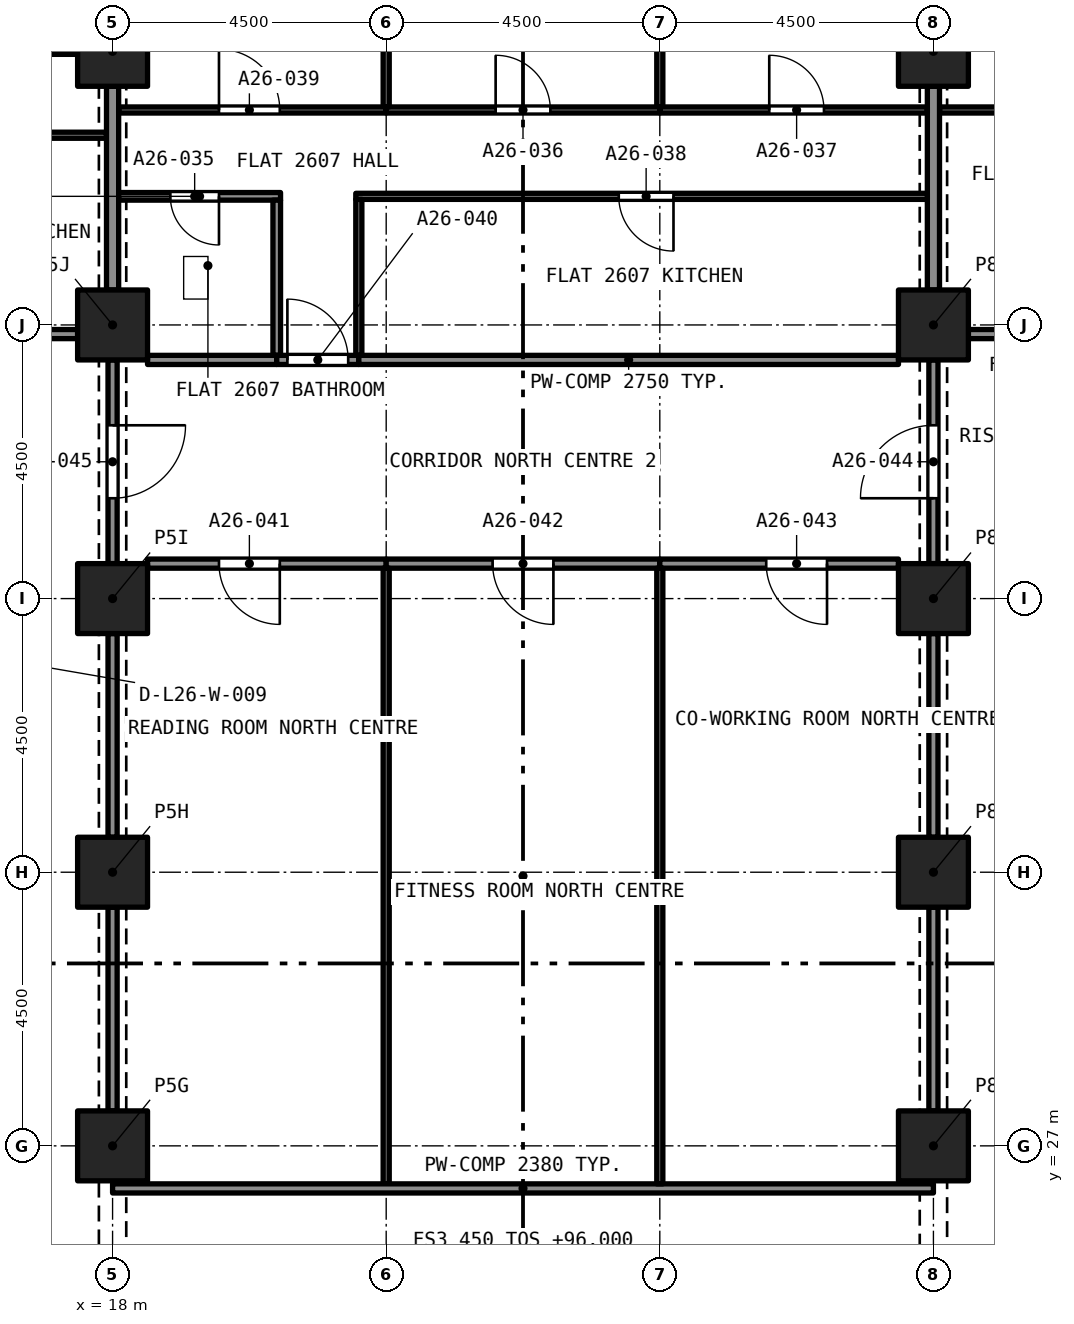
"""IFC4 building model, lengths in metres.
Left out: names, types, materials, properties, quantities, classifications, styles, units other than length and angle.
Written with IfcOpenShell. Run it as: python <this file> out.ifc"""

import sys

from ifc_helpers import new_model, si_unit, direction, frame, frame_2d, origin, origin_2d, place, context, subcontext, project, spatial, rectangle, extrude, element, fill, save


model = new_model("IFC4")
c1 = context("Model", 3, precision=1e-05, world=origin(), true_north=direction((0.0, 1.0)))
c2 = subcontext(c1, "Body", "Model", "MODEL_VIEW")
j1 = project(units=[si_unit("LENGTHUNIT", "METRE"), si_unit("PLANEANGLEUNIT", "RADIAN")], contexts=[c1])
p1 = place(None, origin())
s1 = spatial("IfcSite", under=j1, at=p1, CompositionType="ELEMENT")
p2 = place(p1, origin())
s2 = spatial("IfcBuilding", under=s1, at=p2, CompositionType="ELEMENT")
p3 = place(p2, frame((0.0, 0.0, 96.0)))
s3 = spatial("IfcBuildingStorey", under=s2, at=p3, CompositionType="ELEMENT", Elevation=96.0)
for number, where, z_axis, x_axis in (
    (1, (18.0, 27.0, 0.0), (0.0, 0.0, 1.0), (1.0, 0.0, 0.0)),
    (2, (31.5, 27.0, 0.0), (0.0, 0.0, 1.0), (1.0, 0.0, 0.0)),
    (3, (18.0, 31.5, 0.0), (0.0, 0.0, 1.0), (1.0, 0.0, 0.0)),
    (4, (31.5, 31.5, 0.0), (0.0, 0.0, 1.0), (1.0, 0.0, 0.0)),
    (5, (18.0, 36.0, 0.0), (0.0, 0.0, 1.0), (1.0, 0.0, 0.0)),
    (6, (31.5, 36.0, 0.0), (0.0, 0.0, 1.0), (1.0, 0.0, 0.0)),
    (7, (18.0, 40.5, 0.0), (0.0, 0.0, 1.0), (1.0, 0.0, 0.0)),
    (8, (31.5, 40.5, 0.0), (0.0, 0.0, 1.0), (1.0, 0.0, 0.0)),
    (9, (18.0, 45.0, 0.0), (0.0, 0.0, 1.0), (1.0, 0.0, 0.0)),
    (10, (31.5, 45.0, 0.0), (0.0, 0.0, 1.0), (1.0, 0.0, 0.0)),
):
    element("IfcColumn", number, at=place(p3, frame(where, z_axis=z_axis, x_axis=x_axis)), inside=s3, PredefinedType="COLUMN", context=c2, shape_type="SweptSolid", body=[
        extrude(rectangle(XDim=1.15, YDim=1.15, at=origin_2d()), origin(), (0.0, 0.0, 1.0), 3.2),
    ])
p4 = place(p3, frame((13.5, 45.0, 0.0), z_axis=(0.0, 0.0, 1.0), x_axis=(1.0, 0.0, 0.0)))
e11 = element("IfcWall", 11, at=p4, inside=s3, PredefinedType="PARTITIONING", context=c2, shape_type="SweptSolid", body=[
    extrude(rectangle(XDim=3.925, YDim=0.1, at=frame_2d((1.962, 0.0))), origin(), (0.0, 0.0, 1.0), 2.9),
])
p5 = place(p4, frame((1.8, 0.0, 0.0)))
e12 = element("IfcOpeningElement", 12, at=p5, cuts=e11, PredefinedType="OPENING", context=c2, shape_type="SweptSolid", body=[
    extrude(rectangle(XDim=0.9, YDim=2.1, at=frame_2d((0.45, 1.05))), frame((0.0, 0.06, 0.0), z_axis=(0.0, -1.0, 0.0), x_axis=(1.0, 0.0, 0.0)), (0.0, 0.0, 1.0), 0.12),
])
p6 = place(p3, frame((17.9, 43.62, 0.0), z_axis=(0.0, 0.0, 1.0), x_axis=(-1.0, 0.0, 0.0)))
e13 = element("IfcWall", 13, at=p6, inside=s3, PredefinedType="PARTITIONING", context=c2, shape_type="SweptSolid", body=[
    extrude(rectangle(XDim=6.172, YDim=0.1, at=frame_2d((3.086, 0.0))), origin(), (0.0, 0.0, 1.0), 2.9),
])
p7 = place(p6, frame((2.586, 0.0, 0.0)))
e14 = element("IfcOpeningElement", 14, at=p7, cuts=e13, PredefinedType="OPENING", context=c2, shape_type="SweptSolid", body=[
    extrude(rectangle(XDim=0.9, YDim=2.1, at=frame_2d((0.45, 1.05))), frame((0.0, 0.06, 0.0), z_axis=(0.0, -1.0, 0.0), x_axis=(1.0, 0.0, 0.0)), (0.0, 0.0, 1.0), 0.12),
])
p8 = place(p3, frame((18.0, 41.075, 0.0), z_axis=(0.0, 0.0, 1.0), x_axis=(0.0, 1.0, 0.0)))
e15 = element("IfcWall", 15, at=p8, inside=s3, PredefinedType="PARTITIONING", context=c2, shape_type="SweptSolid", body=[
    extrude(rectangle(XDim=3.35, YDim=0.2, at=frame_2d((1.675, 0.0))), origin(), (0.0, 0.0, 1.0), 2.38),
])
p9 = place(p3, frame((13.35, 40.35, 0.0), z_axis=(0.0, 0.0, 1.0), x_axis=(1.0, 0.0, 0.0)))
e16 = element("IfcWall", 16, at=p9, inside=s3, PredefinedType="PARTITIONING", context=c2, shape_type="SweptSolid", body=[
    extrude(rectangle(XDim=4.075, YDim=0.15, at=frame_2d((2.038, 0.0))), origin(), (0.0, 0.0, 1.0), 2.9),
])
p10 = place(p3, frame((31.6, 44.035, 0.0), z_axis=(0.0, 0.0, 1.0), x_axis=(1.0, 0.0, 0.0)))
e17 = element("IfcWall", 17, at=p10, inside=s3, PredefinedType="PARTITIONING", context=c2, shape_type="SweptSolid", body=[
    extrude(rectangle(XDim=4.4, YDim=0.1, at=frame_2d((2.2, 0.0))), origin(), (0.0, 0.0, 1.0), 2.9),
])
p11 = place(p10, frame((1.65, 0.0, 0.0)))
e18 = element("IfcOpeningElement", 18, at=p11, cuts=e17, PredefinedType="OPENING", context=c2, shape_type="SweptSolid", body=[
    extrude(rectangle(XDim=1.0, YDim=2.1, at=frame_2d((0.5, 1.05))), frame((0.0, 0.06, 0.0), z_axis=(0.0, -1.0, 0.0), x_axis=(1.0, 0.0, 0.0)), (0.0, 0.0, 1.0), 0.12),
])
p12 = place(p3, frame((31.5, 41.075, 0.0), z_axis=(0.0, 0.0, 1.0), x_axis=(0.0, 1.0, 0.0)))
e19 = element("IfcWall", 19, at=p12, inside=s3, PredefinedType="PARTITIONING", context=c2, shape_type="SweptSolid", body=[
    extrude(rectangle(XDim=3.35, YDim=0.2, at=frame_2d((1.675, 0.0))), origin(), (0.0, 0.0, 1.0), 2.38),
])
p13 = place(p3, frame((32.075, 40.35, 0.0), z_axis=(0.0, 0.0, 1.0), x_axis=(1.0, 0.0, 0.0)))
e20 = element("IfcWall", 20, at=p13, inside=s3, PredefinedType="PARTITIONING", context=c2, shape_type="SweptSolid", body=[
    extrude(rectangle(XDim=2.35, YDim=0.15, at=frame_2d((1.175, 0.0))), origin(), (0.0, 0.0, 1.0), 2.9),
])
p14 = place(p13, frame((1.175, 0.0, 0.0)))
e21 = element("IfcOpeningElement", 21, at=p14, cuts=e20, PredefinedType="OPENING", context=c2, shape_type="SweptSolid", body=[
    extrude(rectangle(XDim=1.0, YDim=2.1, at=frame_2d((0.5, 1.05))), frame((0.0, 0.085, 0.0), z_axis=(0.0, -1.0, 0.0), x_axis=(1.0, 0.0, 0.0)), (0.0, 0.0, 1.0), 0.17),
])
p15 = place(p3, frame((20.762, 42.615, 0.0), z_axis=(0.0, 0.0, 1.0), x_axis=(-1.0, 0.0, 0.0)))
e22 = element("IfcWall", 22, at=p15, inside=s3, PredefinedType="PARTITIONING", context=c2, shape_type="SweptSolid", body=[
    extrude(rectangle(XDim=2.662, YDim=0.125, at=frame_2d((1.331, 0.0))), origin(), (0.0, 0.0, 1.0), 2.75),
])
p16 = place(p15, frame((1.012, 0.0, 0.0)))
e23 = element("IfcOpeningElement", 23, at=p16, cuts=e22, PredefinedType="OPENING", context=c2, shape_type="SweptSolid", body=[
    extrude(rectangle(XDim=0.8, YDim=2.1, at=frame_2d((0.4, 1.05))), frame((0.0, 0.073, 0.0), z_axis=(0.0, -1.0, 0.0), x_axis=(1.0, 0.0, 0.0)), (0.0, 0.0, 1.0), 0.145),
])
p17 = place(p3, frame((20.7, 40.0, 0.0), z_axis=(0.0, 0.0, 1.0), x_axis=(0.0, 1.0, 0.0)))
e24 = element("IfcWall", 24, at=p17, inside=s3, PredefinedType="PARTITIONING", context=c2, shape_type="SweptSolid", body=[
    extrude(rectangle(XDim=2.552, YDim=0.125, at=frame_2d((1.276, 0.0))), origin(), (0.0, 0.0, 1.0), 2.75),
])
p18 = place(p3, frame((18.575, 39.925, 0.0), z_axis=(0.0, 0.0, 1.0), x_axis=(1.0, 0.0, 0.0)))
e25 = element("IfcWall", 25, at=p18, inside=s3, PredefinedType="PARTITIONING", context=c2, shape_type="SweptSolid", body=[
    extrude(rectangle(XDim=2.125, YDim=0.15, at=frame_2d((1.062, 0.0))), origin(), (0.0, 0.0, 1.0), 2.75),
])
p19 = place(p3, frame((27.0, 44.085, 0.0), z_axis=(0.0, 0.0, 1.0), x_axis=(0.0, 1.0, 0.0)))
e26 = element("IfcWall", 26, at=p19, inside=s3, PredefinedType="PARTITIONING", context=c2, shape_type="SweptSolid", body=[
    extrude(rectangle(XDim=4.84, YDim=0.1, at=frame_2d((2.42, 0.0))), origin(), (0.0, 0.0, 1.0), 2.75),
])
p20 = place(p3, frame((22.5, 44.035, 0.0), z_axis=(0.0, 0.0, 1.0), x_axis=(1.0, 0.0, 0.0)))
e27 = element("IfcWall", 27, at=p20, inside=s3, PredefinedType="PARTITIONING", context=c2, shape_type="SweptSolid", body=[
    extrude(rectangle(XDim=4.5, YDim=0.1, at=frame_2d((2.25, 0.0))), origin(), (0.0, 0.0, 1.0), 2.75),
])
p21 = place(p20, frame((1.8, 0.0, 0.0)))
e28 = element("IfcOpeningElement", 28, at=p21, cuts=e27, PredefinedType="OPENING", context=c2, shape_type="SweptSolid", body=[
    extrude(rectangle(XDim=0.9, YDim=2.1, at=frame_2d((0.45, 1.05))), frame((0.0, 0.06, 0.0), z_axis=(0.0, -1.0, 0.0), x_axis=(1.0, 0.0, 0.0)), (0.0, 0.0, 1.0), 0.12),
])
p22 = place(p3, frame((22.5, 44.085, 0.0), z_axis=(0.0, 0.0, 1.0), x_axis=(0.0, 1.0, 0.0)))
e29 = element("IfcWall", 29, at=p22, inside=s3, PredefinedType="PARTITIONING", context=c2, shape_type="SweptSolid", body=[
    extrude(rectangle(XDim=4.84, YDim=0.1, at=frame_2d((2.42, 0.0))), origin(), (0.0, 0.0, 1.0), 2.75),
])
p23 = place(p3, frame((27.0, 44.035, 0.0), z_axis=(0.0, 0.0, 1.0), x_axis=(1.0, 0.0, 0.0)))
e30 = element("IfcWall", 30, at=p23, inside=s3, PredefinedType="PARTITIONING", context=c2, shape_type="SweptSolid", body=[
    extrude(rectangle(XDim=4.4, YDim=0.1, at=frame_2d((2.2, 0.0))), origin(), (0.0, 0.0, 1.0), 2.75),
])
p24 = place(p23, frame((1.8, 0.0, 0.0)))
e31 = element("IfcOpeningElement", 31, at=p24, cuts=e30, PredefinedType="OPENING", context=c2, shape_type="SweptSolid", body=[
    extrude(rectangle(XDim=0.9, YDim=2.1, at=frame_2d((0.45, 1.05))), frame((0.0, 0.06, 0.0), z_axis=(0.0, -1.0, 0.0), x_axis=(1.0, 0.0, 0.0)), (0.0, 0.0, 1.0), 0.12),
])
p25 = place(p3, frame((31.4, 42.615, 0.0), z_axis=(0.0, 0.0, 1.0), x_axis=(-1.0, 0.0, 0.0)))
e32 = element("IfcWall", 32, at=p25, inside=s3, PredefinedType="PARTITIONING", context=c2, shape_type="SweptSolid", body=[
    extrude(rectangle(XDim=9.4, YDim=0.1, at=frame_2d((4.7, 0.0))), origin(), (0.0, 0.0, 1.0), 2.75),
])
p26 = place(p25, frame((4.175, 0.0, 0.0)))
e33 = element("IfcOpeningElement", 33, at=p26, cuts=e32, PredefinedType="OPENING", context=c2, shape_type="SweptSolid", body=[
    extrude(rectangle(XDim=0.9, YDim=2.1, at=frame_2d((0.45, 1.05))), frame((0.0, 0.06, 0.0), z_axis=(0.0, -1.0, 0.0), x_axis=(1.0, 0.0, 0.0)), (0.0, 0.0, 1.0), 0.12),
])
p27 = place(p3, frame((22.05, 40.0, 0.0), z_axis=(0.0, 0.0, 1.0), x_axis=(0.0, 1.0, 0.0)))
e34 = element("IfcWall", 34, at=p27, inside=s3, PredefinedType="PARTITIONING", context=c2, shape_type="SweptSolid", body=[
    extrude(rectangle(XDim=2.565, YDim=0.1, at=frame_2d((1.282, 0.0))), origin(), (0.0, 0.0, 1.0), 2.75),
])
p28 = place(p3, frame((18.1, 44.035, 0.0), z_axis=(0.0, 0.0, 1.0), x_axis=(1.0, 0.0, 0.0)))
e35 = element("IfcWall", 35, at=p28, inside=s3, PredefinedType="PARTITIONING", context=c2, shape_type="SweptSolid", body=[
    extrude(rectangle(XDim=4.4, YDim=0.1, at=frame_2d((2.2, 0.0))), origin(), (0.0, 0.0, 1.0), 2.75),
])
p29 = place(p28, frame((1.65, 0.0, 0.0)))
e36 = element("IfcOpeningElement", 36, at=p29, cuts=e35, PredefinedType="OPENING", context=c2, shape_type="SweptSolid", body=[
    extrude(rectangle(XDim=1.0, YDim=2.1, at=frame_2d((0.5, 1.05))), frame((0.0, 0.06, 0.0), z_axis=(0.0, -1.0, 0.0), x_axis=(1.0, 0.0, 0.0)), (0.0, 0.0, 1.0), 0.12),
])
p30 = place(p3, frame((20.7, 39.925, 0.0), z_axis=(0.0, 0.0, 1.0), x_axis=(1.0, 0.0, 0.0)))
e37 = element("IfcWall", 37, at=p30, inside=s3, PredefinedType="PARTITIONING", context=c2, shape_type="SweptSolid", body=[
    extrude(rectangle(XDim=1.35, YDim=0.15, at=frame_2d((0.675, 0.0))), origin(), (0.0, 0.0, 1.0), 2.75),
])
p31 = place(p30, frame((0.175, 0.0, 0.0)))
e38 = element("IfcOpeningElement", 38, at=p31, cuts=e37, PredefinedType="OPENING", context=c2, shape_type="SweptSolid", body=[
    extrude(rectangle(XDim=1.0, YDim=2.1, at=frame_2d((0.5, 1.05))), frame((0.0, 0.085, 0.0), z_axis=(0.0, -1.0, 0.0), x_axis=(1.0, 0.0, 0.0)), (0.0, 0.0, 1.0), 0.17),
])
p32 = place(p3, frame((22.05, 39.925, 0.0), z_axis=(0.0, 0.0, 1.0), x_axis=(1.0, 0.0, 0.0)))
e39 = element("IfcWall", 39, at=p32, inside=s3, PredefinedType="PARTITIONING", context=c2, shape_type="SweptSolid", body=[
    extrude(rectangle(XDim=8.875, YDim=0.15, at=frame_2d((4.438, 0.0))), origin(), (0.0, 0.0, 1.0), 2.75),
])
p33 = place(p3, frame((22.5, 36.575, 0.0), z_axis=(0.0, 0.0, 1.0), x_axis=(-1.0, 0.0, 0.0)))
e40 = element("IfcWall", 40, at=p33, inside=s3, PredefinedType="PARTITIONING", context=c2, shape_type="SweptSolid", body=[
    extrude(rectangle(XDim=3.925, YDim=0.15, at=frame_2d((1.962, 0.0))), origin(), (0.0, 0.0, 1.0), 2.75),
])
p34 = place(p33, frame((1.75, 0.0, 0.0)))
e41 = element("IfcOpeningElement", 41, at=p34, cuts=e40, PredefinedType="OPENING", context=c2, shape_type="SweptSolid", body=[
    extrude(rectangle(XDim=1.0, YDim=2.1, at=frame_2d((0.5, 1.05))), frame((0.0, 0.085, 0.0), z_axis=(0.0, -1.0, 0.0), x_axis=(1.0, 0.0, 0.0)), (0.0, 0.0, 1.0), 0.17),
])
p35 = place(p3, frame((27.0, 36.575, 0.0), z_axis=(0.0, 0.0, 1.0), x_axis=(-1.0, 0.0, 0.0)))
e42 = element("IfcWall", 42, at=p35, inside=s3, PredefinedType="PARTITIONING", context=c2, shape_type="SweptSolid", body=[
    extrude(rectangle(XDim=4.5, YDim=0.15, at=frame_2d((2.25, 0.0))), origin(), (0.0, 0.0, 1.0), 2.75),
])
p36 = place(p35, frame((1.75, 0.0, 0.0)))
e43 = element("IfcOpeningElement", 43, at=p36, cuts=e42, PredefinedType="OPENING", context=c2, shape_type="SweptSolid", body=[
    extrude(rectangle(XDim=1.0, YDim=2.1, at=frame_2d((0.5, 1.05))), frame((0.0, 0.085, 0.0), z_axis=(0.0, -1.0, 0.0), x_axis=(1.0, 0.0, 0.0)), (0.0, 0.0, 1.0), 0.17),
])
p37 = place(p3, frame((30.925, 36.575, 0.0), z_axis=(0.0, 0.0, 1.0), x_axis=(-1.0, 0.0, 0.0)))
e44 = element("IfcWall", 44, at=p37, inside=s3, PredefinedType="PARTITIONING", context=c2, shape_type="SweptSolid", body=[
    extrude(rectangle(XDim=3.925, YDim=0.15, at=frame_2d((1.962, 0.0))), origin(), (0.0, 0.0, 1.0), 2.75),
])
p38 = place(p37, frame((1.175, 0.0, 0.0)))
e45 = element("IfcOpeningElement", 45, at=p38, cuts=e44, PredefinedType="OPENING", context=c2, shape_type="SweptSolid", body=[
    extrude(rectangle(XDim=1.0, YDim=2.1, at=frame_2d((0.5, 1.05))), frame((0.0, 0.085, 0.0), z_axis=(0.0, -1.0, 0.0), x_axis=(1.0, 0.0, 0.0)), (0.0, 0.0, 1.0), 0.17),
])
p39 = place(p3, frame((31.5, 36.575, 0.0), z_axis=(0.0, 0.0, 1.0), x_axis=(0.0, 1.0, 0.0)))
e46 = element("IfcWall", 46, at=p39, inside=s3, PredefinedType="PARTITIONING", context=c2, shape_type="SweptSolid", body=[
    extrude(rectangle(XDim=3.35, YDim=0.15, at=frame_2d((1.675, 0.0))), origin(), (0.0, 0.0, 1.0), 2.38),
])
p40 = place(p39, frame((1.075, 0.0, 0.0)))
e47 = element("IfcOpeningElement", 47, at=p40, cuts=e46, PredefinedType="OPENING", context=c2, shape_type="SweptSolid", body=[
    extrude(rectangle(XDim=1.2, YDim=2.1, at=frame_2d((0.6, 1.05))), frame((0.0, 0.085, 0.0), z_axis=(0.0, -1.0, 0.0), x_axis=(1.0, 0.0, 0.0)), (0.0, 0.0, 1.0), 0.17),
])
p41 = place(p3, frame((18.0, 39.925, 0.0), z_axis=(0.0, 0.0, 1.0), x_axis=(0.0, -1.0, 0.0)))
e48 = element("IfcWall", 48, at=p41, inside=s3, PredefinedType="PARTITIONING", context=c2, shape_type="SweptSolid", body=[
    extrude(rectangle(XDim=3.35, YDim=0.15, at=frame_2d((1.675, 0.0))), origin(), (0.0, 0.0, 1.0), 2.38),
])
p42 = place(p41, frame((1.075, 0.0, 0.0)))
e49 = element("IfcOpeningElement", 49, at=p42, cuts=e48, PredefinedType="OPENING", context=c2, shape_type="SweptSolid", body=[
    extrude(rectangle(XDim=1.2, YDim=2.1, at=frame_2d((0.6, 1.05))), frame((0.0, 0.085, 0.0), z_axis=(0.0, -1.0, 0.0), x_axis=(1.0, 0.0, 0.0)), (0.0, 0.0, 1.0), 0.17),
])
p43 = place(p3, frame((22.5, 26.375, 0.0), z_axis=(0.0, 0.0, 1.0), x_axis=(0.0, 1.0, 0.0)))
e50 = element("IfcWall", 50, at=p43, inside=s3, PredefinedType="PARTITIONING", context=c2, shape_type="SweptSolid", body=[
    extrude(rectangle(XDim=10.125, YDim=0.1, at=frame_2d((5.062, 0.0))), origin(), (0.0, 0.0, 1.0), 2.75),
])
for number, where, z_axis, x_axis in (
    (51, (18.0, 27.575, 0.0), (0.0, 0.0, 1.0), (0.0, 1.0, 0.0)),
    (52, (18.0, 32.075, 0.0), (0.0, 0.0, 1.0), (0.0, 1.0, 0.0)),
):
    element("IfcWall", number, at=place(p3, frame(where, z_axis=z_axis, x_axis=x_axis)), inside=s3, PredefinedType="PARTITIONING", context=c2, shape_type="SweptSolid", body=[
        extrude(rectangle(XDim=3.35, YDim=0.15, at=frame_2d((1.675, 0.0))), origin(), (0.0, 0.0, 1.0), 2.38),
    ])
p44 = place(p3, frame((18.0, 26.3, 0.0), z_axis=(0.0, 0.0, 1.0), x_axis=(1.0, 0.0, 0.0)))
e53 = element("IfcWall", 53, at=p44, inside=s3, PredefinedType="PARTITIONING", context=c2, shape_type="SweptSolid", body=[
    extrude(rectangle(XDim=13.5, YDim=0.15, at=frame_2d((6.75, 0.0))), origin(), (0.0, 0.0, 1.0), 2.38),
])
p45 = place(p3, frame((27.0, 26.375, 0.0), z_axis=(0.0, 0.0, 1.0), x_axis=(0.0, 1.0, 0.0)))
e54 = element("IfcWall", 54, at=p45, inside=s3, PredefinedType="PARTITIONING", context=c2, shape_type="SweptSolid", body=[
    extrude(rectangle(XDim=10.125, YDim=0.1, at=frame_2d((5.062, 0.0))), origin(), (0.0, 0.0, 1.0), 2.75),
])
for number, where, z_axis, x_axis in (
    (55, (31.5, 32.075, 0.0), (0.0, 0.0, 1.0), (0.0, 1.0, 0.0)),
    (56, (31.5, 27.575, 0.0), (0.0, 0.0, 1.0), (0.0, 1.0, 0.0)),
):
    element("IfcWall", number, at=place(p3, frame(where, z_axis=z_axis, x_axis=x_axis)), inside=s3, PredefinedType="PARTITIONING", context=c2, shape_type="SweptSolid", body=[
        extrude(rectangle(XDim=3.35, YDim=0.15, at=frame_2d((1.675, 0.0))), origin(), (0.0, 0.0, 1.0), 2.38),
    ])
p46 = place(p16, origin())
e57 = element("IfcDoor", 57, at=p46, inside=s3, OperationType="SINGLE_SWING_RIGHT", PredefinedType="DOOR", context=c2, shape_type="SweptSolid", body=[
    extrude(rectangle(XDim=0.8, YDim=2.1, at=frame_2d((0.4, 1.05))), frame((0.0, 0.025, 0.0), z_axis=(0.0, -1.0, 0.0), x_axis=(1.0, 0.0, 0.0)), (0.0, 0.0, 1.0), 0.05),
])
fill(e23, e57)
p47 = place(p21, origin())
e58 = element("IfcDoor", 58, at=p47, inside=s3, OperationType="SINGLE_SWING_LEFT", PredefinedType="DOOR", context=c2, shape_type="SweptSolid", body=[
    extrude(rectangle(XDim=0.9, YDim=2.1, at=frame_2d((0.45, 1.05))), frame((0.0, 0.025, 0.0), z_axis=(0.0, -1.0, 0.0), x_axis=(1.0, 0.0, 0.0)), (0.0, 0.0, 1.0), 0.05),
])
fill(e28, e58)
p48 = place(p24, origin())
e59 = element("IfcDoor", 59, at=p48, inside=s3, OperationType="SINGLE_SWING_RIGHT", PredefinedType="DOOR", context=c2, shape_type="SweptSolid", body=[
    extrude(rectangle(XDim=0.9, YDim=2.1, at=frame_2d((0.45, 1.05))), frame((0.0, 0.025, 0.0), z_axis=(0.0, -1.0, 0.0), x_axis=(1.0, 0.0, 0.0)), (0.0, 0.0, 1.0), 0.05),
])
fill(e31, e59)
p49 = place(p26, origin())
e60 = element("IfcDoor", 60, at=p49, inside=s3, OperationType="SINGLE_SWING_LEFT", PredefinedType="DOOR", context=c2, shape_type="SweptSolid", body=[
    extrude(rectangle(XDim=0.9, YDim=2.1, at=frame_2d((0.45, 1.05))), frame((0.0, 0.025, 0.0), z_axis=(0.0, -1.0, 0.0), x_axis=(1.0, 0.0, 0.0)), (0.0, 0.0, 1.0), 0.05),
])
fill(e33, e60)
p50 = place(p29, origin())
e61 = element("IfcDoor", 61, at=p50, inside=s3, OperationType="SINGLE_SWING_LEFT", PredefinedType="DOOR", context=c2, shape_type="SweptSolid", body=[
    extrude(rectangle(XDim=1.0, YDim=2.1, at=frame_2d((0.5, 1.05))), frame((0.0, 0.025, 0.0), z_axis=(0.0, -1.0, 0.0), x_axis=(1.0, 0.0, 0.0)), (0.0, 0.0, 1.0), 0.05),
])
fill(e36, e61)
p51 = place(p31, origin())
e62 = element("IfcDoor", 62, at=p51, inside=s3, OperationType="SINGLE_SWING_RIGHT", PredefinedType="DOOR", context=c2, shape_type="SweptSolid", body=[
    extrude(rectangle(XDim=1.0, YDim=2.1, at=frame_2d((0.5, 1.05))), frame((0.0, 0.025, 0.0), z_axis=(0.0, -1.0, 0.0), x_axis=(1.0, 0.0, 0.0)), (0.0, 0.0, 1.0), 0.05),
])
fill(e38, e62)
p52 = place(p34, origin())
e63 = element("IfcDoor", 63, at=p52, inside=s3, OperationType="SINGLE_SWING_RIGHT", PredefinedType="DOOR", context=c2, shape_type="SweptSolid", body=[
    extrude(rectangle(XDim=1.0, YDim=2.1, at=frame_2d((0.5, 1.05))), frame((0.0, 0.025, 0.0), z_axis=(0.0, -1.0, 0.0), x_axis=(1.0, 0.0, 0.0)), (0.0, 0.0, 1.0), 0.05),
])
fill(e41, e63)
p53 = place(p36, origin())
e64 = element("IfcDoor", 64, at=p53, inside=s3, OperationType="SINGLE_SWING_RIGHT", PredefinedType="DOOR", context=c2, shape_type="SweptSolid", body=[
    extrude(rectangle(XDim=1.0, YDim=2.1, at=frame_2d((0.5, 1.05))), frame((0.0, 0.025, 0.0), z_axis=(0.0, -1.0, 0.0), x_axis=(1.0, 0.0, 0.0)), (0.0, 0.0, 1.0), 0.05),
])
fill(e43, e64)
p54 = place(p38, origin())
e65 = element("IfcDoor", 65, at=p54, inside=s3, OperationType="SINGLE_SWING_LEFT", PredefinedType="DOOR", context=c2, shape_type="SweptSolid", body=[
    extrude(rectangle(XDim=1.0, YDim=2.1, at=frame_2d((0.5, 1.05))), frame((0.0, 0.025, 0.0), z_axis=(0.0, -1.0, 0.0), x_axis=(1.0, 0.0, 0.0)), (0.0, 0.0, 1.0), 0.05),
])
fill(e45, e65)
p55 = place(p40, origin())
e66 = element("IfcDoor", 66, at=p55, inside=s3, OperationType="SINGLE_SWING_LEFT", PredefinedType="DOOR", context=c2, shape_type="SweptSolid", body=[
    extrude(rectangle(XDim=1.2, YDim=2.1, at=frame_2d((0.6, 1.05))), frame((0.0, 0.025, 0.0), z_axis=(0.0, -1.0, 0.0), x_axis=(1.0, 0.0, 0.0)), (0.0, 0.0, 1.0), 0.05),
])
fill(e47, e66)
p56 = place(p42, origin())
e67 = element("IfcDoor", 67, at=p56, inside=s3, OperationType="SINGLE_SWING_LEFT", PredefinedType="DOOR", context=c2, shape_type="SweptSolid", body=[
    extrude(rectangle(XDim=1.2, YDim=2.1, at=frame_2d((0.6, 1.05))), frame((0.0, 0.025, 0.0), z_axis=(0.0, -1.0, 0.0), x_axis=(1.0, 0.0, 0.0)), (0.0, 0.0, 1.0), 0.05),
])
fill(e49, e67)
save(model, sys.argv[1])
